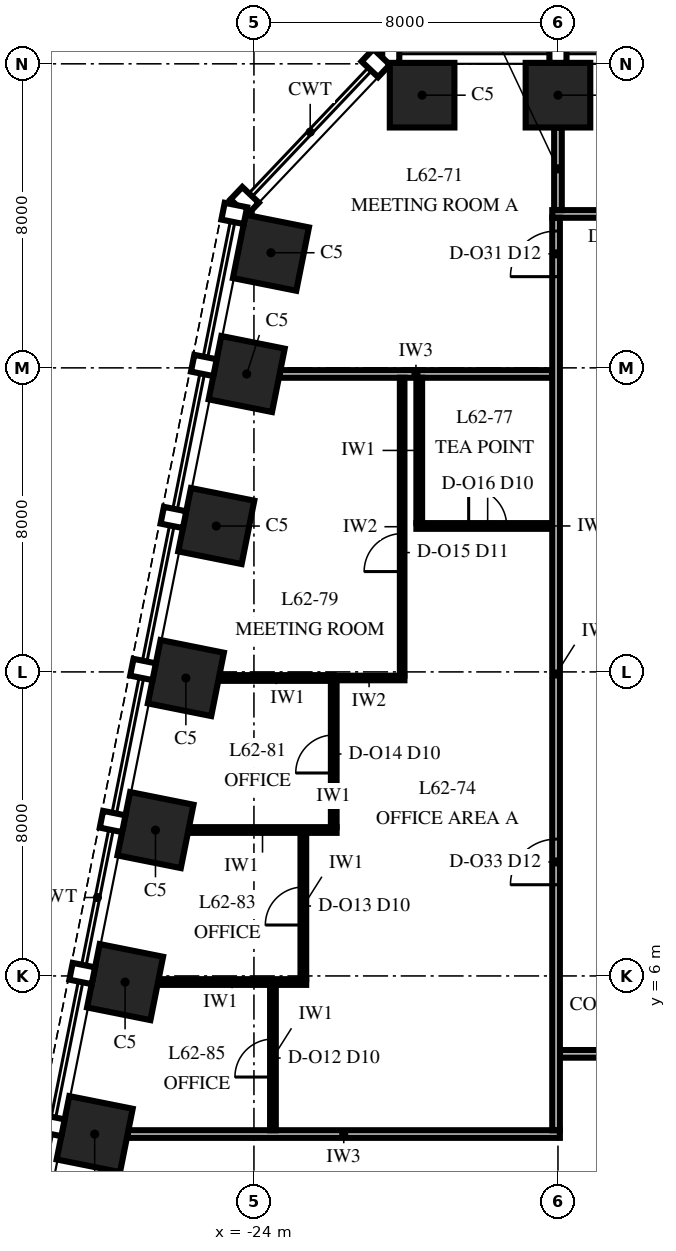
"""IFC4 building model, lengths in metres.
Left out: names, types, materials, properties, quantities, classifications, styles, units other than length and angle.
Written with IfcOpenShell. Run it as: python <this file> out.ifc"""

import sys

from ifc_helpers import new_model, si_unit, direction, frame, frame_2d, origin, origin_2d, place, context, subcontext, project, spatial, rectangle, extrude, element, fill, save


model = new_model("IFC4")
c1 = context("Model", 3, precision=1e-05, world=origin(), true_north=direction((0.0, 1.0)))
c2 = subcontext(c1, "Body", "Model", "MODEL_VIEW")
j1 = project(units=[si_unit("LENGTHUNIT", "METRE"), si_unit("PLANEANGLEUNIT", "RADIAN")], contexts=[c1])
p1 = place(None, origin())
s1 = spatial("IfcSite", under=j1, at=p1, CompositionType="ELEMENT")
p2 = place(p1, origin())
s2 = spatial("IfcBuilding", under=s1, at=p2, CompositionType="ELEMENT")
p3 = place(p2, frame((0.0, 0.0, 268.0)))
s3 = spatial("IfcBuildingStorey", under=s2, at=p3, CompositionType="ELEMENT", Elevation=268.0)
for number, where, z_axis, x_axis in (
    (1, (-16.0, 29.175, 0.0), (0.0, 0.0, 1.0), (-1.0, 0.0, 0.0)),
    (2, (-19.575, 29.175, 0.0), (0.0, 0.0, 1.0), (-1.0, 0.0, 0.0)),
    (3, (-23.553, 25.029, 0.0), (0.0, 0.0, 1.0), (-0.196, -0.981, 0.0)),
    (4, (-24.191, 21.838, 0.0), (0.0, 0.0, 1.0), (-0.196, -0.981, 0.0)),
    (5, (-24.991, 17.838, 0.0), (0.0, 0.0, 1.0), (-0.196, -0.981, 0.0)),
    (6, (-25.791, 13.838, 0.0), (0.0, 0.0, 1.0), (-0.196, -0.981, 0.0)),
    (7, (-26.591, 9.838, 0.0), (0.0, 0.0, 1.0), (-0.196, -0.981, 0.0)),
    (8, (-27.391, 5.838, 0.0), (0.0, 0.0, 1.0), (-0.196, -0.981, 0.0)),
    (9, (-28.191, 1.838, 0.0), (0.0, 0.0, 1.0), (-0.196, -0.981, 0.0)),
):
    element("IfcColumn", number, at=place(p3, frame(where, z_axis=z_axis, x_axis=x_axis)), inside=s3, PredefinedType="COLUMN", context=c2, shape_type="SweptSolid", body=[
        extrude(rectangle(XDim=1.7, YDim=1.7, at=origin_2d()), origin(), (0.0, 0.0, 1.0), 4.0),
    ])
p4 = place(p3, frame((-27.324, 1.84, 0.0), z_axis=(0.0, 0.0, 1.0), x_axis=(1.0, 0.0, 0.0)))
e10 = element("IfcWall", 10, at=p4, inside=s3, PredefinedType="PARTITIONING", context=c2, shape_type="SweptSolid", body=[
    extrude(rectangle(XDim=11.374, YDim=0.2, at=frame_2d((5.687, 0.0))), origin(), (0.0, 0.0, 1.0), 3.23),
])
p5 = place(p3, frame((-15.95, 3.95, 0.0), z_axis=(0.0, 0.0, 1.0), x_axis=(1.0, 0.0, 0.0)))
e11 = element("IfcWall", 11, at=p5, inside=s3, PredefinedType="PARTITIONING", context=c2, shape_type="SweptSolid", body=[
    extrude(rectangle(XDim=31.9, YDim=0.2, at=frame_2d((15.95, 0.0))), origin(), (0.0, 0.0, 1.0), 3.23),
])
p6 = place(p5, frame((7.35, 0.0, 0.0)))
e12 = element("IfcOpeningElement", 12, at=p6, cuts=e11, PredefinedType="OPENING", context=c2, shape_type="SweptSolid", body=[
    extrude(rectangle(XDim=1.2, YDim=2.4, at=frame_2d((0.6, 1.2))), frame((0.0, 0.115, 0.0), z_axis=(0.0, -1.0, 0.0), x_axis=(1.0, 0.0, 0.0)), (0.0, 0.0, 1.0), 0.23),
])
p7 = place(p5, frame((23.35, 0.0, 0.0)))
e13 = element("IfcOpeningElement", 13, at=p7, cuts=e11, PredefinedType="OPENING", context=c2, shape_type="SweptSolid", body=[
    extrude(rectangle(XDim=1.2, YDim=2.4, at=frame_2d((0.6, 1.2))), frame((0.0, 0.115, 0.0), z_axis=(0.0, -1.0, 0.0), x_axis=(1.0, 0.0, 0.0)), (0.0, 0.0, 1.0), 0.23),
])
p8 = place(p3, frame((-26.524, 5.84, 0.0), z_axis=(0.0, 0.0, 1.0), x_axis=(1.0, 0.0, 0.0)))
e14 = element("IfcWall", 14, at=p8, inside=s3, PredefinedType="PARTITIONING", context=c2, shape_type="SweptSolid", body=[
    extrude(rectangle(XDim=3.899, YDim=0.15, at=frame_2d((1.949, 0.0))), origin(), (0.0, 0.0, 1.0), 2.842),
])
p9 = place(p3, frame((-25.724, 9.84, 0.0), z_axis=(0.0, 0.0, 1.0), x_axis=(1.0, 0.0, 0.0)))
e15 = element("IfcWall", 15, at=p9, inside=s3, PredefinedType="PARTITIONING", context=c2, shape_type="SweptSolid", body=[
    extrude(rectangle(XDim=3.899, YDim=0.15, at=frame_2d((1.949, 0.0))), origin(), (0.0, 0.0, 1.0), 3.23),
])
p10 = place(p3, frame((-24.924, 13.84, 0.0), z_axis=(0.0, 0.0, 1.0), x_axis=(1.0, 0.0, 0.0)))
e16 = element("IfcWall", 16, at=p10, inside=s3, PredefinedType="PARTITIONING", context=c2, shape_type="SweptSolid", body=[
    extrude(rectangle(XDim=3.024, YDim=0.15, at=frame_2d((1.512, 0.0))), origin(), (0.0, 0.0, 1.0), 3.23),
])
p11 = place(p3, frame((-21.9, 13.84, 0.0), z_axis=(0.0, 0.0, 1.0), x_axis=(1.0, 0.0, 0.0)))
e17 = element("IfcWall", 17, at=p11, inside=s3, PredefinedType="PARTITIONING", context=c2, shape_type="SweptSolid", body=[
    extrude(rectangle(XDim=1.86, YDim=0.12, at=frame_2d((0.93, 0.0))), origin(), (0.0, 0.0, 1.0), 3.85),
])
p12 = place(p3, frame((-19.725, 17.84, 0.0), z_axis=(0.0, 0.0, 1.0), x_axis=(1.0, 0.0, 0.0)))
e18 = element("IfcWall", 18, at=p12, inside=s3, PredefinedType="PARTITIONING", context=c2, shape_type="SweptSolid", body=[
    extrude(rectangle(XDim=3.575, YDim=0.15, at=frame_2d((1.788, 0.0))), origin(), (0.0, 0.0, 1.0), 3.23),
])
p13 = place(p12, frame((1.375, 0.0, 0.0)))
e19 = element("IfcOpeningElement", 19, at=p13, cuts=e18, PredefinedType="OPENING", context=c2, shape_type="SweptSolid", body=[
    extrude(rectangle(XDim=1.0, YDim=2.3, at=frame_2d((0.5, 1.15))), frame((0.0, 0.09, 0.0), z_axis=(0.0, -1.0, 0.0), x_axis=(1.0, 0.0, 0.0)), (0.0, 0.0, 1.0), 0.18),
])
p14 = place(p3, frame((-23.324, 21.84, 0.0), z_axis=(0.0, 0.0, 1.0), x_axis=(1.0, 0.0, 0.0)))
e20 = element("IfcWall", 20, at=p14, inside=s3, PredefinedType="PARTITIONING", context=c2, shape_type="SweptSolid", body=[
    extrude(rectangle(XDim=7.174, YDim=0.2, at=frame_2d((3.587, 0.0))), origin(), (0.0, 0.0, 1.0), 3.23),
])
p15 = place(p3, frame((-16.15, 26.05, 0.0), z_axis=(0.0, 0.0, 1.0), x_axis=(1.0, 0.0, 0.0)))
e21 = element("IfcWall", 21, at=p15, inside=s3, PredefinedType="PARTITIONING", context=c2, shape_type="SweptSolid", body=[
    extrude(rectangle(XDim=32.3, YDim=0.2, at=frame_2d((16.15, 0.0))), origin(), (0.0, 0.0, 1.0), 3.418),
])
p16 = place(p15, frame((1.55, 0.0, 0.0)))
e22 = element("IfcOpeningElement", 22, at=p16, cuts=e21, PredefinedType="OPENING", context=c2, shape_type="SweptSolid", body=[
    extrude(rectangle(XDim=1.2, YDim=2.4, at=frame_2d((0.6, 1.2))), frame((0.0, 0.115, 0.0), z_axis=(0.0, -1.0, 0.0), x_axis=(1.0, 0.0, 0.0)), (0.0, 0.0, 1.0), 0.23),
])
p17 = place(p15, frame((5.55, 0.0, 0.0)))
e23 = element("IfcOpeningElement", 23, at=p17, cuts=e21, PredefinedType="OPENING", context=c2, shape_type="SweptSolid", body=[
    extrude(rectangle(XDim=1.2, YDim=2.4, at=frame_2d((0.6, 1.2))), frame((0.0, 0.115, 0.0), z_axis=(0.0, -1.0, 0.0), x_axis=(1.0, 0.0, 0.0)), (0.0, 0.0, 1.0), 0.23),
])
p18 = place(p15, frame((9.55, 0.0, 0.0)))
e24 = element("IfcOpeningElement", 24, at=p18, cuts=e21, PredefinedType="OPENING", context=c2, shape_type="SweptSolid", body=[
    extrude(rectangle(XDim=1.2, YDim=2.4, at=frame_2d((0.6, 1.2))), frame((0.0, 0.115, 0.0), z_axis=(0.0, -1.0, 0.0), x_axis=(1.0, 0.0, 0.0)), (0.0, 0.0, 1.0), 0.23),
])
p19 = place(p15, frame((15.55, 0.0, 0.0)))
e25 = element("IfcOpeningElement", 25, at=p19, cuts=e21, PredefinedType="OPENING", context=c2, shape_type="SweptSolid", body=[
    extrude(rectangle(XDim=1.2, YDim=2.4, at=frame_2d((0.6, 1.2))), frame((0.0, 0.115, 0.0), z_axis=(0.0, -1.0, 0.0), x_axis=(1.0, 0.0, 0.0)), (0.0, 0.0, 1.0), 0.23),
])
p20 = place(p15, frame((21.55, 0.0, 0.0)))
e26 = element("IfcOpeningElement", 26, at=p20, cuts=e21, PredefinedType="OPENING", context=c2, shape_type="SweptSolid", body=[
    extrude(rectangle(XDim=1.2, YDim=2.4, at=frame_2d((0.6, 1.2))), frame((0.0, 0.115, 0.0), z_axis=(0.0, -1.0, 0.0), x_axis=(1.0, 0.0, 0.0)), (0.0, 0.0, 1.0), 0.23),
])
p21 = place(p15, frame((25.55, 0.0, 0.0)))
e27 = element("IfcOpeningElement", 27, at=p21, cuts=e21, PredefinedType="OPENING", context=c2, shape_type="SweptSolid", body=[
    extrude(rectangle(XDim=1.2, YDim=2.4, at=frame_2d((0.6, 1.2))), frame((0.0, 0.115, 0.0), z_axis=(0.0, -1.0, 0.0), x_axis=(1.0, 0.0, 0.0)), (0.0, 0.0, 1.0), 0.23),
])
p22 = place(p15, frame((29.55, 0.0, 0.0)))
e28 = element("IfcOpeningElement", 28, at=p22, cuts=e21, PredefinedType="OPENING", context=c2, shape_type="SweptSolid", body=[
    extrude(rectangle(XDim=1.2, YDim=2.4, at=frame_2d((0.6, 1.2))), frame((0.0, 0.115, 0.0), z_axis=(0.0, -1.0, 0.0), x_axis=(1.0, 0.0, 0.0)), (0.0, 0.0, 1.0), 0.23),
])
p23 = place(p3, frame((-23.5, 1.94, 0.0), z_axis=(0.0, 0.0, 1.0), x_axis=(0.0, 1.0, 0.0)))
e29 = element("IfcWall", 29, at=p23, inside=s3, PredefinedType="PARTITIONING", context=c2, shape_type="SweptSolid", body=[
    extrude(rectangle(XDim=3.825, YDim=0.15, at=frame_2d((1.913, 0.0))), origin(), (0.0, 0.0, 1.0), 3.85),
])
p24 = place(p23, frame((1.4, 0.0, 0.0)))
e30 = element("IfcOpeningElement", 30, at=p24, cuts=e29, PredefinedType="OPENING", context=c2, shape_type="SweptSolid", body=[
    extrude(rectangle(XDim=1.0, YDim=2.3, at=frame_2d((0.5, 1.15))), frame((0.0, 0.09, 0.0), z_axis=(0.0, -1.0, 0.0), x_axis=(1.0, 0.0, 0.0)), (0.0, 0.0, 1.0), 0.18),
])
p25 = place(p3, frame((-22.7, 5.915, 0.0), z_axis=(0.0, 0.0, 1.0), x_axis=(0.0, 1.0, 0.0)))
e31 = element("IfcWall", 31, at=p25, inside=s3, PredefinedType="PARTITIONING", context=c2, shape_type="SweptSolid", body=[
    extrude(rectangle(XDim=3.85, YDim=0.15, at=frame_2d((1.925, 0.0))), origin(), (0.0, 0.0, 1.0), 2.842),
])
p26 = place(p25, frame((1.425, 0.0, 0.0)))
e32 = element("IfcOpeningElement", 32, at=p26, cuts=e31, PredefinedType="OPENING", context=c2, shape_type="SweptSolid", body=[
    extrude(rectangle(XDim=1.0, YDim=2.3, at=frame_2d((0.5, 1.15))), frame((0.0, 0.09, 0.0), z_axis=(0.0, -1.0, 0.0), x_axis=(1.0, 0.0, 0.0)), (0.0, 0.0, 1.0), 0.18),
])
p27 = place(p3, frame((-21.9, 9.915, 0.0), z_axis=(0.0, 0.0, 1.0), x_axis=(0.0, 1.0, 0.0)))
e33 = element("IfcWall", 33, at=p27, inside=s3, PredefinedType="PARTITIONING", context=c2, shape_type="SweptSolid", body=[
    extrude(rectangle(XDim=3.85, YDim=0.15, at=frame_2d((1.925, 0.0))), origin(), (0.0, 0.0, 1.0), 3.85),
])
p28 = place(p27, frame((1.425, 0.0, 0.0)))
e34 = element("IfcOpeningElement", 34, at=p28, cuts=e33, PredefinedType="OPENING", context=c2, shape_type="SweptSolid", body=[
    extrude(rectangle(XDim=1.0, YDim=2.3, at=frame_2d((0.5, 1.15))), frame((0.0, 0.09, 0.0), z_axis=(0.0, -1.0, 0.0), x_axis=(1.0, 0.0, 0.0)), (0.0, 0.0, 1.0), 0.18),
])
p29 = place(p3, frame((-20.1, 13.9, 0.0), z_axis=(0.0, 0.0, 1.0), x_axis=(0.0, 1.0, 0.0)))
e35 = element("IfcWall", 35, at=p29, inside=s3, PredefinedType="PARTITIONING", context=c2, shape_type="SweptSolid", body=[
    extrude(rectangle(XDim=7.84, YDim=0.12, at=frame_2d((3.92, 0.0))), origin(), (0.0, 0.0, 1.0), 3.23),
])
p30 = place(p29, frame((2.74, 0.0, 0.0)))
e36 = element("IfcOpeningElement", 36, at=p30, cuts=e35, PredefinedType="OPENING", context=c2, shape_type="SweptSolid", body=[
    extrude(rectangle(XDim=1.0, YDim=2.4, at=frame_2d((0.5, 1.2))), frame((0.0, 0.075, 0.0), z_axis=(0.0, -1.0, 0.0), x_axis=(1.0, 0.0, 0.0)), (0.0, 0.0, 1.0), 0.15),
])
p31 = place(p3, frame((-19.65, 17.915, 0.0), z_axis=(0.0, 0.0, 1.0), x_axis=(0.0, 1.0, 0.0)))
e37 = element("IfcWall", 37, at=p31, inside=s3, PredefinedType="PARTITIONING", context=c2, shape_type="SweptSolid", body=[
    extrude(rectangle(XDim=3.825, YDim=0.15, at=frame_2d((1.913, 0.0))), origin(), (0.0, 0.0, 1.0), 3.23),
])
p32 = place(p3, frame((-16.05, 1.94, 0.0), z_axis=(0.0, 0.0, 1.0), x_axis=(0.0, 1.0, 0.0)))
e38 = element("IfcWall", 38, at=p32, inside=s3, PredefinedType="PARTITIONING", context=c2, shape_type="SweptSolid", body=[
    extrude(rectangle(XDim=24.01, YDim=0.2, at=frame_2d((12.005, 0.0))), origin(), (0.0, 0.0, 1.0), 2.842),
])
p33 = place(p32, frame((22.46, 0.0, 0.0)))
e39 = element("IfcOpeningElement", 39, at=p33, cuts=e38, PredefinedType="OPENING", context=c2, shape_type="SweptSolid", body=[
    extrude(rectangle(XDim=1.2, YDim=2.4, at=frame_2d((0.6, 1.2))), frame((0.0, 0.115, 0.0), z_axis=(0.0, -1.0, 0.0), x_axis=(1.0, 0.0, 0.0)), (0.0, 0.0, 1.0), 0.23),
])
p34 = place(p32, frame((6.46, 0.0, 0.0)))
e40 = element("IfcOpeningElement", 40, at=p34, cuts=e38, PredefinedType="OPENING", context=c2, shape_type="SweptSolid", body=[
    extrude(rectangle(XDim=1.2, YDim=2.4, at=frame_2d((0.6, 1.2))), frame((0.0, 0.115, 0.0), z_axis=(0.0, -1.0, 0.0), x_axis=(1.0, 0.0, 0.0)), (0.0, 0.0, 1.0), 0.23),
])
p35 = place(p3, frame((-16.0, 26.15, 0.0), z_axis=(0.0, 0.0, 1.0), x_axis=(0.0, 1.0, 0.0)))
e41 = element("IfcWall", 41, at=p35, inside=s3, PredefinedType="PARTITIONING", context=c2, shape_type="SweptSolid", body=[
    extrude(rectangle(XDim=2.175, YDim=0.2, at=frame_2d((1.087, 0.0))), origin(), (0.0, 0.0, 1.0), 3.418),
])
p36 = place(p24, origin())
e42 = element("IfcDoor", 42, at=p36, inside=s3, OperationType="SINGLE_SWING_LEFT", PredefinedType="DOOR", context=c2, shape_type="SweptSolid", body=[
    extrude(rectangle(XDim=1.0, YDim=2.3, at=frame_2d((0.5, 1.15))), frame((0.0, 0.075, 0.0), z_axis=(0.0, -1.0, 0.0), x_axis=(1.0, 0.0, 0.0)), (0.0, 0.0, 1.0), 0.149),
])
fill(e30, e42)
p37 = place(p26, origin())
e43 = element("IfcDoor", 43, at=p37, inside=s3, OperationType="SINGLE_SWING_LEFT", PredefinedType="DOOR", context=c2, shape_type="SweptSolid", body=[
    extrude(rectangle(XDim=1.0, YDim=2.3, at=frame_2d((0.5, 1.15))), frame((0.0, 0.075, 0.0), z_axis=(0.0, -1.0, 0.0), x_axis=(1.0, 0.0, 0.0)), (0.0, 0.0, 1.0), 0.149),
])
fill(e32, e43)
p38 = place(p28, origin())
e44 = element("IfcDoor", 44, at=p38, inside=s3, OperationType="SINGLE_SWING_LEFT", PredefinedType="DOOR", context=c2, shape_type="SweptSolid", body=[
    extrude(rectangle(XDim=1.0, YDim=2.3, at=frame_2d((0.5, 1.15))), frame((0.0, 0.075, 0.0), z_axis=(0.0, -1.0, 0.0), x_axis=(1.0, 0.0, 0.0)), (0.0, 0.0, 1.0), 0.149),
])
fill(e34, e44)
p39 = place(p30, origin())
e45 = element("IfcDoor", 45, at=p39, inside=s3, OperationType="SINGLE_SWING_RIGHT", PredefinedType="DOOR", context=c2, shape_type="SweptSolid", body=[
    extrude(rectangle(XDim=1.0, YDim=2.4, at=frame_2d((0.5, 1.2))), frame((0.0, 0.06, 0.0), z_axis=(0.0, -1.0, 0.0), x_axis=(1.0, 0.0, 0.0)), (0.0, 0.0, 1.0), 0.12),
])
fill(e36, e45)
p40 = place(p13, origin())
e46 = element("IfcDoor", 46, at=p40, inside=s3, OperationType="SINGLE_SWING_LEFT", PredefinedType="DOOR", context=c2, shape_type="SweptSolid", body=[
    extrude(rectangle(XDim=1.0, YDim=2.3, at=frame_2d((0.5, 1.15))), frame((0.0, 0.075, 0.0), z_axis=(0.0, -1.0, 0.0), x_axis=(1.0, 0.0, 0.0)), (0.0, 0.0, 1.0), 0.149),
])
fill(e19, e46)
p41 = place(p33, origin())
e47 = element("IfcDoor", 47, at=p41, inside=s3, OperationType="SINGLE_SWING_LEFT", PredefinedType="DOOR", context=c2, shape_type="SweptSolid", body=[
    extrude(rectangle(XDim=1.2, YDim=2.4, at=frame_2d((0.6, 1.2))), frame((0.0, 0.1, 0.0), z_axis=(0.0, -1.0, 0.0), x_axis=(1.0, 0.0, 0.0)), (0.0, 0.0, 1.0), 0.199),
])
fill(e39, e47)
p42 = place(p34, origin())
e48 = element("IfcDoor", 48, at=p42, inside=s3, OperationType="SINGLE_SWING_LEFT", PredefinedType="DOOR", context=c2, shape_type="SweptSolid", body=[
    extrude(rectangle(XDim=1.2, YDim=2.4, at=frame_2d((0.6, 1.2))), frame((0.0, 0.1, 0.0), z_axis=(0.0, -1.0, 0.0), x_axis=(1.0, 0.0, 0.0)), (0.0, 0.0, 1.0), 0.199),
])
fill(e40, e48)
save(model, sys.argv[1])
